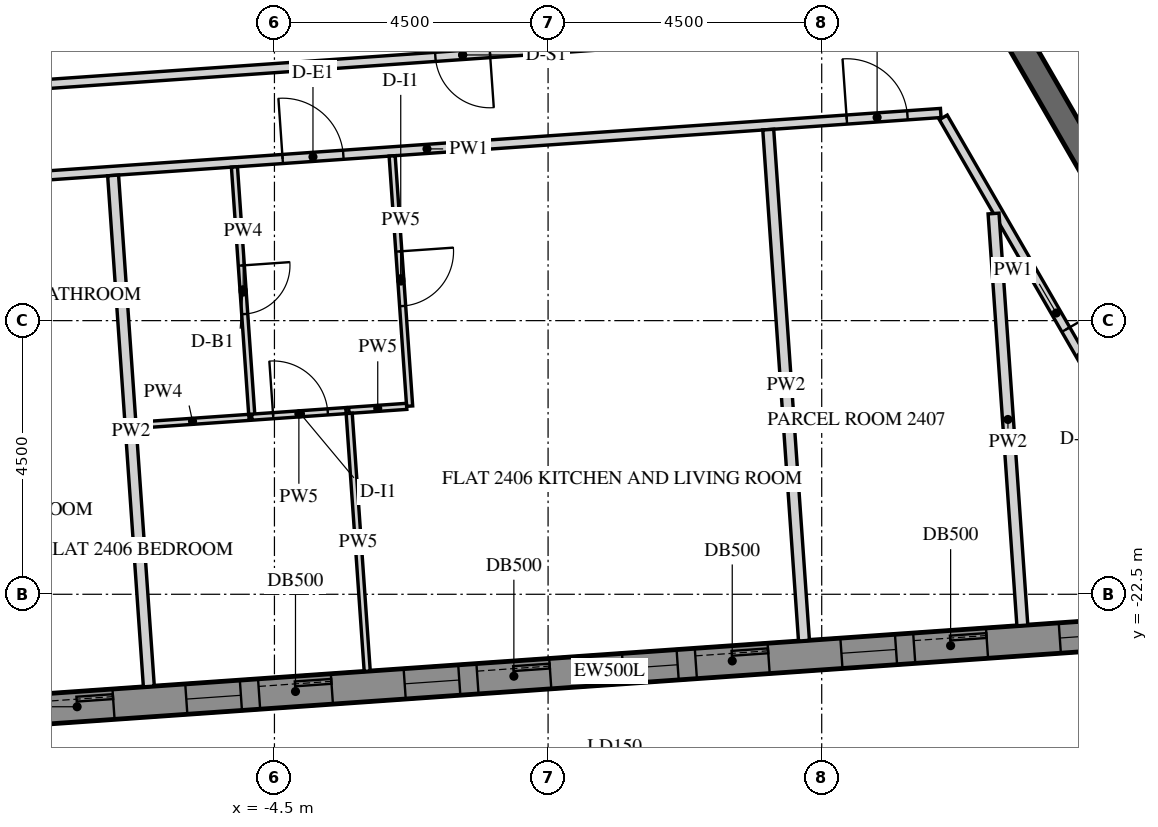
"""IFC4 building model, lengths in metres.
Left out: names, types, materials, properties, quantities, classifications, styles, units other than length and angle.
Written with IfcOpenShell. Run it as: python <this file> out.ifc"""

import sys

from ifc_helpers import new_model, si_unit, direction, frame, frame_2d, origin, place, context, subcontext, project, spatial, polyline, rectangle, outline, extrude, element, fill, save


model = new_model("IFC4")
c1 = context("Model", 3, precision=1e-05, world=origin(), true_north=direction((0.0, 1.0)))
c2 = subcontext(c1, "Body", "Model", "MODEL_VIEW")
j1 = project(units=[si_unit("LENGTHUNIT", "METRE"), si_unit("PLANEANGLEUNIT", "RADIAN")], contexts=[c1])
p1 = place(None, origin())
s1 = spatial("IfcSite", under=j1, at=p1, CompositionType="ELEMENT")
p2 = place(p1, origin())
s2 = spatial("IfcBuilding", under=s1, at=p2, CompositionType="ELEMENT")
p3 = place(p2, frame((0.0, 0.0, 303.0)))
s3 = spatial("IfcBuildingStorey", under=s2, at=p3, CompositionType="ELEMENT", Elevation=303.0)
p4 = place(p3, frame((-10.86, -24.567, -0.15), z_axis=(0.0, 0.0, 1.0), x_axis=(0.997564329317, 0.06975248292, 0.0)))
e1 = element("IfcWall", 1, at=p4, inside=s3, PredefinedType="SOLIDWALL", context=c2, shape_type="SweptSolid", body=[
    extrude(outline(polyline([(0.25, -0.25), (22.795, -0.25), (23.295, 0.25), (-0.25, 0.25), (0.25, -0.25)])), origin(), (0.0, 0.0, 1.0), 3.9),
])
p5 = place(p4, frame((1.323, 0.0, 1.05)))
e2 = element("IfcOpeningElement", 2, at=p5, cuts=e1, PredefinedType="OPENING", context=c2, shape_type="SweptSolid", body=[
    extrude(rectangle(XDim=0.9, YDim=1.5, at=frame_2d((0.45, 0.75))), frame((0.0, 0.26, 0.0), z_axis=(0.0, -1.0, 0.0), x_axis=(1.0, 0.0, 0.0)), (0.0, 0.0, 1.0), 0.52),
])
p6 = place(p4, frame((2.522, 0.0, 0.15)))
e3 = element("IfcOpeningElement", 3, at=p6, cuts=e1, PredefinedType="OPENING", context=c2, shape_type="SweptSolid", body=[
    extrude(rectangle(XDim=1.2, YDim=2.4, at=frame_2d((0.6, 1.2))), frame((0.0, 0.26, 0.0), z_axis=(0.0, -1.0, 0.0), x_axis=(1.0, 0.0, 0.0)), (0.0, 0.0, 1.0), 0.52),
])
p7 = place(p4, frame((4.922, 0.0, 1.05)))
e4 = element("IfcOpeningElement", 4, at=p7, cuts=e1, PredefinedType="OPENING", context=c2, shape_type="SweptSolid", body=[
    extrude(rectangle(XDim=0.9, YDim=1.5, at=frame_2d((0.45, 0.75))), frame((0.0, 0.26, 0.0), z_axis=(0.0, -1.0, 0.0), x_axis=(1.0, 0.0, 0.0)), (0.0, 0.0, 1.0), 0.52),
])
p8 = place(p4, frame((6.122, 0.0, 0.15)))
e5 = element("IfcOpeningElement", 5, at=p8, cuts=e1, PredefinedType="OPENING", context=c2, shape_type="SweptSolid", body=[
    extrude(rectangle(XDim=1.2, YDim=2.4, at=frame_2d((0.6, 1.2))), frame((0.0, 0.26, 0.0), z_axis=(0.0, -1.0, 0.0), x_axis=(1.0, 0.0, 0.0)), (0.0, 0.0, 1.0), 0.52),
])
p9 = place(p4, frame((8.522, 0.0, 1.05)))
e6 = element("IfcOpeningElement", 6, at=p9, cuts=e1, PredefinedType="OPENING", context=c2, shape_type="SweptSolid", body=[
    extrude(rectangle(XDim=0.9, YDim=1.5, at=frame_2d((0.45, 0.75))), frame((0.0, 0.26, 0.0), z_axis=(0.0, -1.0, 0.0), x_axis=(1.0, 0.0, 0.0)), (0.0, 0.0, 1.0), 0.52),
])
p10 = place(p4, frame((9.722, 0.0, 0.15)))
e7 = element("IfcOpeningElement", 7, at=p10, cuts=e1, PredefinedType="OPENING", context=c2, shape_type="SweptSolid", body=[
    extrude(rectangle(XDim=1.2, YDim=2.4, at=frame_2d((0.6, 1.2))), frame((0.0, 0.26, 0.0), z_axis=(0.0, -1.0, 0.0), x_axis=(1.0, 0.0, 0.0)), (0.0, 0.0, 1.0), 0.52),
])
p11 = place(p4, frame((12.122, 0.0, 1.05)))
e8 = element("IfcOpeningElement", 8, at=p11, cuts=e1, PredefinedType="OPENING", context=c2, shape_type="SweptSolid", body=[
    extrude(rectangle(XDim=0.9, YDim=1.5, at=frame_2d((0.45, 0.75))), frame((0.0, 0.26, 0.0), z_axis=(0.0, -1.0, 0.0), x_axis=(1.0, 0.0, 0.0)), (0.0, 0.0, 1.0), 0.52),
])
p12 = place(p4, frame((13.323, 0.0, 0.15)))
e9 = element("IfcOpeningElement", 9, at=p12, cuts=e1, PredefinedType="OPENING", context=c2, shape_type="SweptSolid", body=[
    extrude(rectangle(XDim=1.2, YDim=2.4, at=frame_2d((0.6, 1.2))), frame((0.0, 0.26, 0.0), z_axis=(0.0, -1.0, 0.0), x_axis=(1.0, 0.0, 0.0)), (0.0, 0.0, 1.0), 0.52),
])
p13 = place(p4, frame((15.722, 0.0, 1.05)))
e10 = element("IfcOpeningElement", 10, at=p13, cuts=e1, PredefinedType="OPENING", context=c2, shape_type="SweptSolid", body=[
    extrude(rectangle(XDim=0.9, YDim=1.5, at=frame_2d((0.45, 0.75))), frame((0.0, 0.26, 0.0), z_axis=(0.0, -1.0, 0.0), x_axis=(1.0, 0.0, 0.0)), (0.0, 0.0, 1.0), 0.52),
])
p14 = place(p4, frame((16.922, 0.0, 0.15)))
e11 = element("IfcOpeningElement", 11, at=p14, cuts=e1, PredefinedType="OPENING", context=c2, shape_type="SweptSolid", body=[
    extrude(rectangle(XDim=1.2, YDim=2.4, at=frame_2d((0.6, 1.2))), frame((0.0, 0.26, 0.0), z_axis=(0.0, -1.0, 0.0), x_axis=(1.0, 0.0, 0.0)), (0.0, 0.0, 1.0), 0.52),
])
p15 = place(p4, frame((19.323, 0.0, 1.05)))
e12 = element("IfcOpeningElement", 12, at=p15, cuts=e1, PredefinedType="OPENING", context=c2, shape_type="SweptSolid", body=[
    extrude(rectangle(XDim=0.9, YDim=1.5, at=frame_2d((0.45, 0.75))), frame((0.0, 0.26, 0.0), z_axis=(0.0, -1.0, 0.0), x_axis=(1.0, 0.0, 0.0)), (0.0, 0.0, 1.0), 0.52),
])
p16 = place(p4, frame((20.522, 0.0, 0.15)))
e13 = element("IfcOpeningElement", 13, at=p16, cuts=e1, PredefinedType="OPENING", context=c2, shape_type="SweptSolid", body=[
    extrude(rectangle(XDim=1.2, YDim=2.4, at=frame_2d((0.6, 1.2))), frame((0.0, 0.26, 0.0), z_axis=(0.0, -1.0, 0.0), x_axis=(1.0, 0.0, 0.0)), (0.0, 0.0, 1.0), 0.52),
])
p17 = place(p3, frame((6.351, -11.0, -0.15), z_axis=(0.0, 0.0, 1.0), x_axis=(0.499998894578, -0.866026041999, 0.0)))
e14 = element("IfcWall", 14, at=p17, inside=s3, PredefinedType="SHEAR", context=c2, shape_type="SweptSolid", body=[
    extrude(rectangle(XDim=15.544, YDim=0.4, at=frame_2d((7.772, 0.0))), origin(), (0.0, 0.0, 1.0), 3.9),
])
p18 = place(p17, frame((6.872, 0.0, 0.15)))
e15 = element("IfcOpeningElement", 15, at=p18, cuts=e14, PredefinedType="OPENING", context=c2, shape_type="SweptSolid", body=[
    extrude(rectangle(XDim=1.8, YDim=2.4, at=frame_2d((0.9, 1.2))), frame((0.0, 0.21, 0.0), z_axis=(0.0, -1.0, 0.0), x_axis=(1.0, 0.0, 0.0)), (0.0, 0.0, 1.0), 0.42),
])
p19 = place(p3, frame((-10.44, -15.767, 0.0), z_axis=(0.0, 0.0, 1.0), x_axis=(0.997565037323, 0.069742356651, 0.0)))
e16 = element("IfcWall", 16, at=p19, inside=s3, PredefinedType="PARTITIONING", context=c2, shape_type="SweptSolid", body=[
    extrude(rectangle(XDim=16.939, YDim=0.15, at=frame_2d((8.47, 0.0))), origin(), (0.0, 0.0, 1.0), 2.988),
])
p20 = place(p19, frame((6.09, 0.0, 0.0)))
e17 = element("IfcOpeningElement", 17, at=p20, cuts=e16, PredefinedType="OPENING", context=c2, shape_type="SweptSolid", body=[
    extrude(rectangle(XDim=1.0, YDim=2.1, at=frame_2d((0.5, 1.05))), frame((0.0, 0.085, 0.0), z_axis=(0.0, -1.0, 0.0), x_axis=(1.0, 0.0, 0.0)), (0.0, 0.0, 1.0), 0.17),
])
p21 = place(p19, frame((15.39, 0.0, 0.0)))
e18 = element("IfcOpeningElement", 18, at=p21, cuts=e16, PredefinedType="OPENING", context=c2, shape_type="SweptSolid", body=[
    extrude(rectangle(XDim=1.0, YDim=2.1, at=frame_2d((0.5, 1.05))), frame((0.0, 0.085, 0.0), z_axis=(0.0, -1.0, 0.0), x_axis=(1.0, 0.0, 0.0)), (0.0, 0.0, 1.0), 0.17),
])
p22 = place(p3, frame((6.5, -14.657, 0.0), z_axis=(0.0, 0.0, 1.0), x_axis=(0.499966098742, -0.8660449758, 0.0)))
e19 = element("IfcWall", 19, at=p22, inside=s3, PredefinedType="PARTITIONING", context=c2, shape_type="SweptSolid", body=[
    extrude(rectangle(XDim=7.431, YDim=0.15, at=frame_2d((3.715, 0.0))), origin(), (0.0, 0.0, 1.0), 2.988),
])
p23 = place(p22, frame((4.03, 0.0, 0.0)))
e20 = element("IfcOpeningElement", 20, at=p23, cuts=e19, PredefinedType="OPENING", context=c2, shape_type="SweptSolid", body=[
    extrude(rectangle(XDim=1.0, YDim=2.1, at=frame_2d((0.5, 1.05))), frame((0.0, 0.085, 0.0), z_axis=(0.0, -1.0, 0.0), x_axis=(1.0, 0.0, 0.0)), (0.0, 0.0, 1.0), 0.17),
])
p24 = place(p3, frame((6.884, -13.052, 0.0), z_axis=(0.0, 0.0, 1.0), x_axis=(-0.997564224443, -0.069753982764, 0.0)))
e21 = element("IfcWall", 21, at=p24, inside=s3, PredefinedType="PARTITIONING", context=c2, shape_type="SweptSolid", body=[
    extrude(rectangle(XDim=16.618, YDim=0.15, at=frame_2d((8.309, 0.0))), origin(), (0.0, 0.0, 1.0), 2.988),
])
p25 = place(p24, frame((7.859, 0.0, 0.0)))
e22 = element("IfcOpeningElement", 22, at=p25, cuts=e21, PredefinedType="OPENING", context=c2, shape_type="SweptSolid", body=[
    extrude(rectangle(XDim=0.9, YDim=2.1, at=frame_2d((0.45, 1.05))), frame((0.0, 0.085, 0.0), z_axis=(0.0, -1.0, 0.0), x_axis=(1.0, 0.0, 0.0)), (0.0, 0.0, 1.0), 0.17),
])
p26 = place(p3, frame((-6.565, -24.017, 0.0), z_axis=(0.0, 0.0, 1.0), x_axis=(-0.069749826803, 0.997564515037, 0.0)))
e23 = element("IfcWall", 23, at=p26, inside=s3, PredefinedType="PARTITIONING", context=c2, shape_type="SweptSolid", body=[
    extrude(rectangle(XDim=8.425, YDim=0.18, at=frame_2d((4.212, 0.0))), origin(), (0.0, 0.0, 1.0), 2.988),
])
p27 = place(p3, frame((-2.564, -15.291, 0.0), z_axis=(0.0, 0.0, 1.0), x_axis=(0.069720168556, -0.997566588302, 0.0)))
e24 = element("IfcWall", 24, at=p27, inside=s3, PredefinedType="PARTITIONING", context=c2, shape_type="SweptSolid", body=[
    extrude(rectangle(XDim=4.125, YDim=0.1, at=frame_2d((2.062, 0.0))), origin(), (0.0, 0.0, 1.0), 2.988),
])
p28 = place(p27, frame((1.575, 0.0, 0.0)))
e25 = element("IfcOpeningElement", 25, at=p28, cuts=e24, PredefinedType="OPENING", context=c2, shape_type="SweptSolid", body=[
    extrude(rectangle(XDim=0.9, YDim=2.1, at=frame_2d((0.45, 1.05))), frame((0.0, 0.06, 0.0), z_axis=(0.0, -1.0, 0.0), x_axis=(1.0, 0.0, 0.0)), (0.0, 0.0, 1.0), 0.12),
])
p29 = place(p3, frame((-2.326, -19.41, 0.0), z_axis=(0.0, 0.0, 1.0), x_axis=(-0.997564323253, -0.069752569646, 0.0)))
e26 = element("IfcWall", 26, at=p29, inside=s3, PredefinedType="PARTITIONING", context=c2, shape_type="SweptSolid", body=[
    extrude(rectangle(XDim=0.952, YDim=0.1, at=frame_2d((0.476, 0.0))), origin(), (0.0, 0.0, 1.0), 2.988),
])
p30 = place(p3, frame((-3.271, -19.526, 0.0), z_axis=(0.0, 0.0, 1.0), x_axis=(0.069793686433, -0.997561447398, 0.0)))
e27 = element("IfcWall", 27, at=p30, inside=s3, PredefinedType="PARTITIONING", context=c2, shape_type="SweptSolid", body=[
    extrude(rectangle(XDim=4.25, YDim=0.1, at=frame_2d((2.125, 0.0))), origin(), (0.0, 0.0, 1.0), 2.988),
])
p31 = place(p3, frame((4.208, -23.263, 0.0), z_axis=(0.0, 0.0, 1.0), x_axis=(-0.069749826803, 0.997564515037, 0.0)))
e28 = element("IfcWall", 28, at=p31, inside=s3, PredefinedType="PARTITIONING", context=c2, shape_type="SweptSolid", body=[
    extrude(rectangle(XDim=8.425, YDim=0.18, at=frame_2d((4.212, 0.0))), origin(), (0.0, 0.0, 1.0), 2.988),
])
p32 = place(p3, frame((-5.158, -15.472, 0.0), z_axis=(0.0, 0.0, 1.0), x_axis=(0.069779065701, -0.997562470219, 0.0)))
e29 = element("IfcWall", 29, at=p32, inside=s3, PredefinedType="PARTITIONING", context=c2, shape_type="SweptSolid", body=[
    extrude(rectangle(XDim=4.125, YDim=0.1, at=frame_2d((2.062, 0.0))), origin(), (0.0, 0.0, 1.0), 2.988),
])
p33 = place(p32, frame((1.625, 0.0, 0.0)))
e30 = element("IfcOpeningElement", 30, at=p33, cuts=e29, PredefinedType="OPENING", context=c2, shape_type="SweptSolid", body=[
    extrude(rectangle(XDim=0.8, YDim=2.1, at=frame_2d((0.4, 1.05))), frame((0.0, 0.06, 0.0), z_axis=(0.0, -1.0, 0.0), x_axis=(1.0, 0.0, 0.0)), (0.0, 0.0, 1.0), 0.12),
])
p34 = place(p3, frame((-4.872, -19.588, 0.0), z_axis=(0.0, 0.0, 1.0), x_axis=(0.997558309684, 0.069838519316, 0.0)))
e31 = element("IfcWall", 31, at=p34, inside=s3, PredefinedType="PARTITIONING", context=c2, shape_type="SweptSolid", body=[
    extrude(rectangle(XDim=1.552, YDim=0.1, at=frame_2d((0.776, 0.0))), origin(), (0.0, 0.0, 1.0), 2.988),
])
p35 = place(p34, frame((0.352, 0.0, 0.0)))
e32 = element("IfcOpeningElement", 32, at=p35, cuts=e31, PredefinedType="OPENING", context=c2, shape_type="SweptSolid", body=[
    extrude(rectangle(XDim=0.9, YDim=2.1, at=frame_2d((0.45, 1.05))), frame((0.0, 0.06, 0.0), z_axis=(0.0, -1.0, 0.0), x_axis=(1.0, 0.0, 0.0)), (0.0, 0.0, 1.0), 0.12),
])
p36 = place(p3, frame((-6.776, -19.721, 0.0), z_axis=(0.0, 0.0, 1.0), x_axis=(0.997564079323, 0.069756058123, 0.0)))
e33 = element("IfcWall", 33, at=p36, inside=s3, PredefinedType="PARTITIONING", context=c2, shape_type="SweptSolid", body=[
    extrude(rectangle(XDim=1.862, YDim=0.1, at=frame_2d((0.931, 0.0))), origin(), (0.0, 0.0, 1.0), 2.988),
])
p37 = place(p3, frame((7.8, -23.012, 0.0), z_axis=(0.0, 0.0, 1.0), x_axis=(-0.069757205717, 0.997563999075, 0.0)))
e34 = element("IfcWall", 34, at=p37, inside=s3, PredefinedType="PARTITIONING", context=c2, shape_type="SweptSolid", body=[
    extrude(rectangle(XDim=6.79, YDim=0.18, at=frame_2d((3.395, 0.0))), origin(), (0.0, 0.0, 1.0), 2.988),
])
p38 = place(p6, frame((0.0, 0.175, 0.0)))
e35 = element("IfcDoor", 35, at=p38, inside=s3, OperationType="SLIDING_TO_LEFT", PredefinedType="DOOR", context=c2, shape_type="SweptSolid", body=[
    extrude(rectangle(XDim=1.2, YDim=2.4, at=frame_2d((0.6, 1.2))), frame((0.0, 0.025, 0.0), z_axis=(0.0, -1.0, 0.0), x_axis=(1.0, 0.0, 0.0)), (0.0, 0.0, 1.0), 0.05),
])
fill(e3, e35)
p39 = place(p7, frame((0.0, 0.18, 0.0)))
e36 = element("IfcWindow", 36, at=p39, inside=s3, PartitioningType="SINGLE_PANEL", PredefinedType="WINDOW", context=c2, shape_type="SweptSolid", body=[
    extrude(rectangle(XDim=0.9, YDim=1.5, at=frame_2d((0.45, 0.75))), frame((0.0, 0.03, 0.0), z_axis=(0.0, -1.0, 0.0), x_axis=(1.0, 0.0, 0.0)), (0.0, 0.0, 1.0), 0.06),
])
fill(e4, e36)
p40 = place(p8, frame((0.0, 0.175, 0.0)))
e37 = element("IfcDoor", 37, at=p40, inside=s3, OperationType="SLIDING_TO_LEFT", PredefinedType="DOOR", context=c2, shape_type="SweptSolid", body=[
    extrude(rectangle(XDim=1.2, YDim=2.4, at=frame_2d((0.6, 1.2))), frame((0.0, 0.025, 0.0), z_axis=(0.0, -1.0, 0.0), x_axis=(1.0, 0.0, 0.0)), (0.0, 0.0, 1.0), 0.05),
])
fill(e5, e37)
p41 = place(p9, frame((0.0, 0.18, 0.0)))
e38 = element("IfcWindow", 38, at=p41, inside=s3, PartitioningType="SINGLE_PANEL", PredefinedType="WINDOW", context=c2, shape_type="SweptSolid", body=[
    extrude(rectangle(XDim=0.9, YDim=1.5, at=frame_2d((0.45, 0.75))), frame((0.0, 0.03, 0.0), z_axis=(0.0, -1.0, 0.0), x_axis=(1.0, 0.0, 0.0)), (0.0, 0.0, 1.0), 0.06),
])
fill(e6, e38)
p42 = place(p10, frame((0.0, 0.175, 0.0)))
e39 = element("IfcDoor", 39, at=p42, inside=s3, OperationType="SLIDING_TO_LEFT", PredefinedType="DOOR", context=c2, shape_type="SweptSolid", body=[
    extrude(rectangle(XDim=1.2, YDim=2.4, at=frame_2d((0.6, 1.2))), frame((0.0, 0.025, 0.0), z_axis=(0.0, -1.0, 0.0), x_axis=(1.0, 0.0, 0.0)), (0.0, 0.0, 1.0), 0.05),
])
fill(e7, e39)
p43 = place(p11, frame((0.0, 0.18, 0.0)))
e40 = element("IfcWindow", 40, at=p43, inside=s3, PartitioningType="SINGLE_PANEL", PredefinedType="WINDOW", context=c2, shape_type="SweptSolid", body=[
    extrude(rectangle(XDim=0.9, YDim=1.5, at=frame_2d((0.45, 0.75))), frame((0.0, 0.03, 0.0), z_axis=(0.0, -1.0, 0.0), x_axis=(1.0, 0.0, 0.0)), (0.0, 0.0, 1.0), 0.06),
])
fill(e8, e40)
p44 = place(p12, frame((0.0, 0.175, 0.0)))
e41 = element("IfcDoor", 41, at=p44, inside=s3, OperationType="SLIDING_TO_LEFT", PredefinedType="DOOR", context=c2, shape_type="SweptSolid", body=[
    extrude(rectangle(XDim=1.2, YDim=2.4, at=frame_2d((0.6, 1.2))), frame((0.0, 0.025, 0.0), z_axis=(0.0, -1.0, 0.0), x_axis=(1.0, 0.0, 0.0)), (0.0, 0.0, 1.0), 0.05),
])
fill(e9, e41)
p45 = place(p13, frame((0.0, 0.18, 0.0)))
e42 = element("IfcWindow", 42, at=p45, inside=s3, PartitioningType="SINGLE_PANEL", PredefinedType="WINDOW", context=c2, shape_type="SweptSolid", body=[
    extrude(rectangle(XDim=0.9, YDim=1.5, at=frame_2d((0.45, 0.75))), frame((0.0, 0.03, 0.0), z_axis=(0.0, -1.0, 0.0), x_axis=(1.0, 0.0, 0.0)), (0.0, 0.0, 1.0), 0.06),
])
fill(e10, e42)
p46 = place(p14, frame((0.0, 0.175, 0.0)))
e43 = element("IfcDoor", 43, at=p46, inside=s3, OperationType="SLIDING_TO_LEFT", PredefinedType="DOOR", context=c2, shape_type="SweptSolid", body=[
    extrude(rectangle(XDim=1.2, YDim=2.4, at=frame_2d((0.6, 1.2))), frame((0.0, 0.025, 0.0), z_axis=(0.0, -1.0, 0.0), x_axis=(1.0, 0.0, 0.0)), (0.0, 0.0, 1.0), 0.05),
])
fill(e11, e43)
p47 = place(p15, frame((0.0, 0.18, 0.0)))
e44 = element("IfcWindow", 44, at=p47, inside=s3, PartitioningType="SINGLE_PANEL", PredefinedType="WINDOW", context=c2, shape_type="SweptSolid", body=[
    extrude(rectangle(XDim=0.9, YDim=1.5, at=frame_2d((0.45, 0.75))), frame((0.0, 0.03, 0.0), z_axis=(0.0, -1.0, 0.0), x_axis=(1.0, 0.0, 0.0)), (0.0, 0.0, 1.0), 0.06),
])
fill(e12, e44)
p48 = place(p20, origin())
e45 = element("IfcDoor", 45, at=p48, inside=s3, OperationType="SINGLE_SWING_LEFT", PredefinedType="DOOR", context=c2, shape_type="SweptSolid", body=[
    extrude(rectangle(XDim=1.0, YDim=2.1, at=frame_2d((0.5, 1.05))), frame((0.0, 0.025, 0.0), z_axis=(0.0, -1.0, 0.0), x_axis=(1.0, 0.0, 0.0)), (0.0, 0.0, 1.0), 0.05),
])
fill(e17, e45)
p49 = place(p33, origin())
e46 = element("IfcDoor", 46, at=p49, inside=s3, OperationType="SINGLE_SWING_RIGHT", PredefinedType="DOOR", context=c2, shape_type="SweptSolid", body=[
    extrude(rectangle(XDim=0.8, YDim=2.1, at=frame_2d((0.4, 1.05))), frame((0.0, 0.025, 0.0), z_axis=(0.0, -1.0, 0.0), x_axis=(1.0, 0.0, 0.0)), (0.0, 0.0, 1.0), 0.05),
])
fill(e30, e46)
p50 = place(p28, origin())
e47 = element("IfcDoor", 47, at=p50, inside=s3, OperationType="SINGLE_SWING_RIGHT", PredefinedType="DOOR", context=c2, shape_type="SweptSolid", body=[
    extrude(rectangle(XDim=0.9, YDim=2.1, at=frame_2d((0.45, 1.05))), frame((0.0, 0.025, 0.0), z_axis=(0.0, -1.0, 0.0), x_axis=(1.0, 0.0, 0.0)), (0.0, 0.0, 1.0), 0.05),
])
fill(e25, e47)
p51 = place(p35, origin())
e48 = element("IfcDoor", 48, at=p51, inside=s3, OperationType="SINGLE_SWING_LEFT", PredefinedType="DOOR", context=c2, shape_type="SweptSolid", body=[
    extrude(rectangle(XDim=0.9, YDim=2.1, at=frame_2d((0.45, 1.05))), frame((0.0, 0.025, 0.0), z_axis=(0.0, -1.0, 0.0), x_axis=(1.0, 0.0, 0.0)), (0.0, 0.0, 1.0), 0.05),
])
fill(e32, e48)
p52 = place(p21, origin())
e49 = element("IfcDoor", 49, at=p52, inside=s3, OperationType="SINGLE_SWING_LEFT", PredefinedType="DOOR", context=c2, shape_type="SweptSolid", body=[
    extrude(rectangle(XDim=1.0, YDim=2.1, at=frame_2d((0.5, 1.05))), frame((0.0, 0.025, 0.0), z_axis=(0.0, -1.0, 0.0), x_axis=(1.0, 0.0, 0.0)), (0.0, 0.0, 1.0), 0.05),
])
fill(e18, e49)
p53 = place(p23, origin())
e50 = element("IfcDoor", 50, at=p53, inside=s3, OperationType="SINGLE_SWING_RIGHT", PredefinedType="DOOR", context=c2, shape_type="SweptSolid", body=[
    extrude(rectangle(XDim=1.0, YDim=2.1, at=frame_2d((0.5, 1.05))), frame((0.0, 0.025, 0.0), z_axis=(0.0, -1.0, 0.0), x_axis=(1.0, 0.0, 0.0)), (0.0, 0.0, 1.0), 0.05),
])
fill(e20, e50)
p54 = place(p25, origin())
e51 = element("IfcDoor", 51, at=p54, inside=s3, OperationType="SINGLE_SWING_RIGHT", PredefinedType="DOOR", context=c2, shape_type="SweptSolid", body=[
    extrude(rectangle(XDim=0.9, YDim=2.1, at=frame_2d((0.45, 1.05))), frame((0.0, 0.025, 0.0), z_axis=(0.0, -1.0, 0.0), x_axis=(1.0, 0.0, 0.0)), (0.0, 0.0, 1.0), 0.05),
])
fill(e22, e51)
save(model, sys.argv[1])
